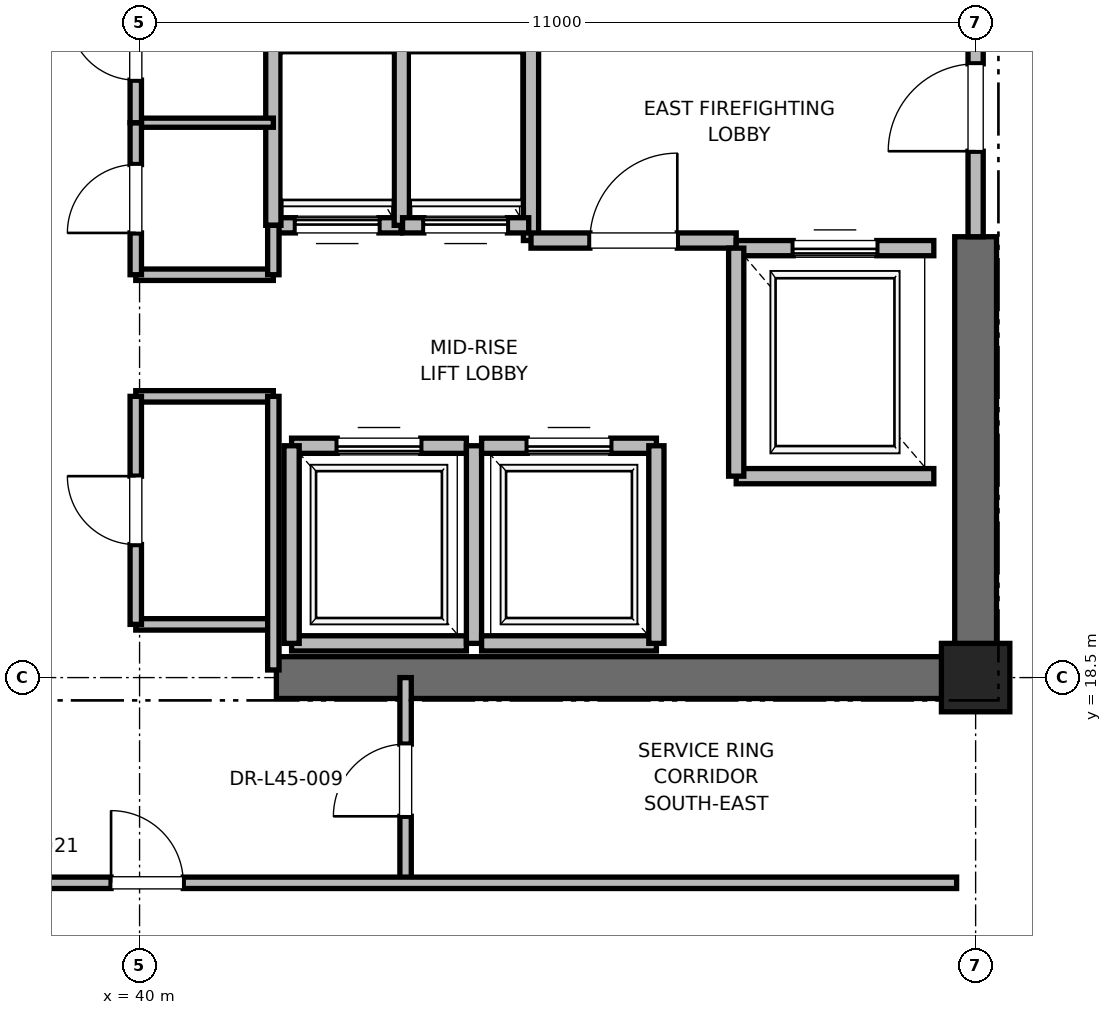
"""IFC4 building model, lengths in metres.
Left out: names, types, materials, properties, quantities, classifications, styles, units other than length and angle.
Written with IfcOpenShell. Run it as: python <this file> out.ifc"""

import sys

from ifc_helpers import new_model, si_unit, direction, frame, frame_2d, origin, origin_2d, place, context, subcontext, project, spatial, rectangle, extrude, element, fill, save


model = new_model("IFC4")
c1 = context("Model", 3, precision=1e-05, world=origin(), true_north=direction((0.0, 1.0)))
c2 = subcontext(c1, "Body", "Model", "MODEL_VIEW")
j1 = project(units=[si_unit("LENGTHUNIT", "METRE"), si_unit("PLANEANGLEUNIT", "RADIAN")], contexts=[c1])
p1 = place(None, origin())
s1 = spatial("IfcSite", under=j1, at=p1, CompositionType="ELEMENT")
p2 = place(p1, origin())
s2 = spatial("IfcBuilding", under=s1, at=p2, CompositionType="ELEMENT")
p3 = place(p2, frame((0.0, 0.0, 194.8)))
s3 = spatial("IfcBuildingStorey", under=s2, at=p3, CompositionType="ELEMENT", Elevation=194.8)
p4 = place(p3, frame((51.0, 18.5, 0.0), z_axis=(0.0, 0.0, 1.0), x_axis=(1.0, 0.0, 0.0)))
e1 = element("IfcColumn", 1, at=p4, inside=s3, PredefinedType="PILASTER", context=c2, shape_type="SweptSolid", body=[
    extrude(rectangle(XDim=0.9, YDim=0.9, at=origin_2d()), origin(), (0.0, 0.0, 1.0), 5.4),
])
p5 = place(p3, frame((41.8, 18.5, 0.0), z_axis=(0.0, 0.0, 1.0), x_axis=(1.0, 0.0, 0.0)))
e2 = element("IfcWall", 2, at=p5, inside=s3, PredefinedType="SHEAR", context=c2, shape_type="SweptSolid", body=[
    extrude(rectangle(XDim=9.2, YDim=0.55, at=frame_2d((4.6, 0.0))), origin(), (0.0, 0.0, 1.0), 5.1),
])
p6 = place(p3, frame((51.0, 18.5, 0.0), z_axis=(0.0, 0.0, 1.0), x_axis=(0.0, 1.0, 0.0)))
e3 = element("IfcWall", 3, at=p6, inside=s3, PredefinedType="SHEAR", context=c2, shape_type="SweptSolid", body=[
    extrude(rectangle(XDim=5.8, YDim=0.55, at=frame_2d((2.9, 0.0))), origin(), (0.0, 0.0, 1.0), 5.1),
])
p7 = place(p3, frame((45.15, 24.25, 0.0), z_axis=(0.0, 0.0, 1.0), x_axis=(0.0, 1.0, 0.0)))
e4 = element("IfcWall", 4, at=p7, inside=s3, PredefinedType="PARTITIONING", context=c2, shape_type="SweptSolid", body=[
    extrude(rectangle(XDim=3.37, YDim=0.2, at=frame_2d((1.685, 0.0))), origin(), (0.0, 0.0, 1.0), 5.1),
])
p8 = place(p3, frame((45.15, 24.25, 0.0), z_axis=(0.0, 0.0, 1.0), x_axis=(1.0, 0.0, 0.0)))
e5 = element("IfcWall", 5, at=p8, inside=s3, PredefinedType="PARTITIONING", context=c2, shape_type="SweptSolid", body=[
    extrude(rectangle(XDim=2.7, YDim=0.2, at=frame_2d((1.35, 0.0))), origin(), (0.0, 0.0, 1.0), 5.1),
])
p9 = place(p8, frame((0.775, 0.0, 0.0)))
e6 = element("IfcOpeningElement", 6, at=p9, cuts=e5, PredefinedType="OPENING", context=c2, shape_type="SweptSolid", body=[
    extrude(rectangle(XDim=1.15, YDim=2.2, at=frame_2d((0.575, 1.1))), frame((0.0, 0.1, 0.0), z_axis=(0.0, -1.0, 0.0), x_axis=(1.0, 0.0, 0.0)), (0.0, 0.0, 1.0), 0.2),
])
p10 = place(p3, frame((51.0, 24.3, 0.0), z_axis=(0.0, 0.0, 1.0), x_axis=(0.0, 1.0, 0.0)))
e7 = element("IfcWall", 7, at=p10, inside=s3, PredefinedType="PARTITIONING", context=c2, shape_type="SweptSolid", body=[
    extrude(rectangle(XDim=3.4, YDim=0.2, at=frame_2d((1.7, 0.0))), origin(), (0.0, 0.0, 1.0), 4.08),
])
p11 = place(p10, frame((1.125, 0.0, 0.0)))
e8 = element("IfcOpeningElement", 8, at=p11, cuts=e7, PredefinedType="OPENING", context=c2, shape_type="SweptSolid", body=[
    extrude(rectangle(XDim=1.15, YDim=2.2, at=frame_2d((0.575, 1.1))), frame((0.0, 0.1, 0.0), z_axis=(0.0, -1.0, 0.0), x_axis=(1.0, 0.0, 0.0)), (0.0, 0.0, 1.0), 0.2),
])
p12 = place(p3, frame((47.85, 21.15, 0.0), z_axis=(0.0, 0.0, 1.0), x_axis=(1.0, 0.0, 0.0)))
e9 = element("IfcWall", 9, at=p12, inside=s3, PredefinedType="SOLIDWALL", context=c2, shape_type="SweptSolid", body=[
    extrude(rectangle(XDim=2.6, YDim=0.2, at=frame_2d((1.3, 0.0))), origin(), (0.0, 0.0, 1.0), 5.1),
])
p13 = place(p3, frame((50.45, 24.15, 0.0), z_axis=(0.0, 0.0, 1.0), x_axis=(-1.0, 0.0, 0.0)))
e10 = element("IfcWall", 10, at=p13, inside=s3, PredefinedType="SOLIDWALL", context=c2, shape_type="SweptSolid", body=[
    extrude(rectangle(XDim=2.6, YDim=0.2, at=frame_2d((1.3, 0.0))), origin(), (0.0, 0.0, 1.0), 4.08),
])
p14 = place(p13, frame((0.75, 0.0, 0.0)))
e11 = element("IfcOpeningElement", 11, at=p14, cuts=e10, PredefinedType="OPENING", context=c2, shape_type="SweptSolid", body=[
    extrude(rectangle(XDim=1.1, YDim=2.2, at=frame_2d((0.55, 1.1))), frame((0.0, 0.1, 0.0), z_axis=(0.0, -1.0, 0.0), x_axis=(1.0, 0.0, 0.0)), (0.0, 0.0, 1.0), 0.2),
])
p15 = place(p3, frame((47.85, 24.15, 0.0), z_axis=(0.0, 0.0, 1.0), x_axis=(0.0, -1.0, 0.0)))
e12 = element("IfcWall", 12, at=p15, inside=s3, PredefinedType="SOLIDWALL", context=c2, shape_type="SweptSolid", body=[
    extrude(rectangle(XDim=3.0, YDim=0.2, at=frame_2d((1.5, 0.0))), origin(), (0.0, 0.0, 1.0), 5.1),
])
p16 = place(p3, frame((42.0, 18.95, 0.0), z_axis=(0.0, 0.0, 1.0), x_axis=(1.0, 0.0, 0.0)))
e13 = element("IfcWall", 13, at=p16, inside=s3, PredefinedType="SOLIDWALL", context=c2, shape_type="SweptSolid", body=[
    extrude(rectangle(XDim=2.3, YDim=0.2, at=frame_2d((1.15, 0.0))), origin(), (0.0, 0.0, 1.0), 4.08),
])
p17 = place(p3, frame((44.3, 21.55, 0.0), z_axis=(0.0, 0.0, 1.0), x_axis=(-1.0, 0.0, 0.0)))
e14 = element("IfcWall", 14, at=p17, inside=s3, PredefinedType="SOLIDWALL", context=c2, shape_type="SweptSolid", body=[
    extrude(rectangle(XDim=2.3, YDim=0.2, at=frame_2d((1.15, 0.0))), origin(), (0.0, 0.0, 1.0), 5.1),
])
p18 = place(p17, frame((0.6, 0.0, 0.0)))
e15 = element("IfcOpeningElement", 15, at=p18, cuts=e14, PredefinedType="OPENING", context=c2, shape_type="SweptSolid", body=[
    extrude(rectangle(XDim=1.1, YDim=2.2, at=frame_2d((0.55, 1.1))), frame((0.0, 0.1, 0.0), z_axis=(0.0, -1.0, 0.0), x_axis=(1.0, 0.0, 0.0)), (0.0, 0.0, 1.0), 0.2),
])
p19 = place(p3, frame((42.0, 21.55, 0.0), z_axis=(0.0, 0.0, 1.0), x_axis=(0.0, -1.0, 0.0)))
e16 = element("IfcWall", 16, at=p19, inside=s3, PredefinedType="SOLIDWALL", context=c2, shape_type="SweptSolid", body=[
    extrude(rectangle(XDim=2.6, YDim=0.2, at=frame_2d((1.3, 0.0))), origin(), (0.0, 0.0, 1.0), 4.08),
])
p20 = place(p3, frame((44.4, 18.95, 0.0), z_axis=(0.0, 0.0, 1.0), x_axis=(0.0, 1.0, 0.0)))
e17 = element("IfcWall", 17, at=p20, inside=s3, PredefinedType="SOLIDWALL", context=c2, shape_type="SweptSolid", body=[
    extrude(rectangle(XDim=2.6, YDim=0.2, at=frame_2d((1.3, 0.0))), origin(), (0.0, 0.0, 1.0), 5.1),
])
p21 = place(p3, frame((44.5, 18.95, 0.0), z_axis=(0.0, 0.0, 1.0), x_axis=(1.0, 0.0, 0.0)))
e18 = element("IfcWall", 18, at=p21, inside=s3, PredefinedType="SOLIDWALL", context=c2, shape_type="SweptSolid", body=[
    extrude(rectangle(XDim=2.3, YDim=0.2, at=frame_2d((1.15, 0.0))), origin(), (0.0, 0.0, 1.0), 5.1),
])
p22 = place(p3, frame((46.8, 21.55, 0.0), z_axis=(0.0, 0.0, 1.0), x_axis=(-1.0, 0.0, 0.0)))
e19 = element("IfcWall", 19, at=p22, inside=s3, PredefinedType="SOLIDWALL", context=c2, shape_type="SweptSolid", body=[
    extrude(rectangle(XDim=2.3, YDim=0.2, at=frame_2d((1.15, 0.0))), origin(), (0.0, 0.0, 1.0), 5.1),
])
p23 = place(p22, frame((0.6, 0.0, 0.0)))
e20 = element("IfcOpeningElement", 20, at=p23, cuts=e19, PredefinedType="OPENING", context=c2, shape_type="SweptSolid", body=[
    extrude(rectangle(XDim=1.1, YDim=2.2, at=frame_2d((0.55, 1.1))), frame((0.0, 0.1, 0.0), z_axis=(0.0, -1.0, 0.0), x_axis=(1.0, 0.0, 0.0)), (0.0, 0.0, 1.0), 0.2),
])
p24 = place(p3, frame((46.8, 18.95, 0.0), z_axis=(0.0, 0.0, 1.0), x_axis=(0.0, 1.0, 0.0)))
e21 = element("IfcWall", 21, at=p24, inside=s3, PredefinedType="SOLIDWALL", context=c2, shape_type="SweptSolid", body=[
    extrude(rectangle(XDim=2.6, YDim=0.2, at=frame_2d((1.3, 0.0))), origin(), (0.0, 0.0, 1.0), 5.1),
])
p25 = place(p3, frame((41.76, 24.45, 0.0), z_axis=(0.0, 0.0, 1.0), x_axis=(1.0, 0.0, 0.0)))
e22 = element("IfcWall", 22, at=p25, inside=s3, PredefinedType="SOLIDWALL", context=c2, shape_type="SweptSolid", body=[
    extrude(rectangle(XDim=1.68, YDim=0.2, at=frame_2d((0.84, 0.0))), origin(), (0.0, 0.0, 1.0), 5.1),
])
p26 = place(p25, frame((0.29, 0.0, 0.0)))
e23 = element("IfcOpeningElement", 23, at=p26, cuts=e22, PredefinedType="OPENING", context=c2, shape_type="SweptSolid", body=[
    extrude(rectangle(XDim=1.1, YDim=2.2, at=frame_2d((0.55, 1.1))), frame((0.0, 0.1, 0.0), z_axis=(0.0, -1.0, 0.0), x_axis=(1.0, 0.0, 0.0)), (0.0, 0.0, 1.0), 0.2),
])
for number, where, z_axis, x_axis in (
    (24, (41.76, 27.05, 0.0), (0.0, 0.0, 1.0), (0.0, -1.0, 0.0)),
    (25, (43.45, 24.45, 0.0), (0.0, 0.0, 1.0), (0.0, 1.0, 0.0)),
):
    element("IfcWall", number, at=place(p3, frame(where, z_axis=z_axis, x_axis=x_axis)), inside=s3, PredefinedType="SOLIDWALL", context=c2, shape_type="SweptSolid", body=[
        extrude(rectangle(XDim=2.6, YDim=0.2, at=frame_2d((1.3, 0.0))), origin(), (0.0, 0.0, 1.0), 5.1),
    ])
p27 = place(p3, frame((43.46, 24.45, 0.0), z_axis=(0.0, 0.0, 1.0), x_axis=(1.0, 0.0, 0.0)))
e26 = element("IfcWall", 26, at=p27, inside=s3, PredefinedType="SOLIDWALL", context=c2, shape_type="SweptSolid", body=[
    extrude(rectangle(XDim=1.66, YDim=0.2, at=frame_2d((0.83, 0.0))), origin(), (0.0, 0.0, 1.0), 5.1),
])
p28 = place(p27, frame((0.28, 0.0, 0.0)))
e27 = element("IfcOpeningElement", 27, at=p28, cuts=e26, PredefinedType="OPENING", context=c2, shape_type="SweptSolid", body=[
    extrude(rectangle(XDim=1.1, YDim=2.2, at=frame_2d((0.55, 1.1))), frame((0.0, 0.1, 0.0), z_axis=(0.0, -1.0, 0.0), x_axis=(1.0, 0.0, 0.0)), (0.0, 0.0, 1.0), 0.2),
])
for number, where, z_axis, x_axis in (
    (28, (39.95, 19.2, 0.0), (0.0, 0.0, 1.0), (1.0, 0.0, 0.0)),
    (29, (39.95, 22.2, 0.0), (0.0, 0.0, 1.0), (1.0, 0.0, 0.0)),
    (30, (39.95, 23.8, 0.0), (0.0, 0.0, 1.0), (1.0, 0.0, 0.0)),
):
    element("IfcWall", number, at=place(p3, frame(where, z_axis=z_axis, x_axis=x_axis)), inside=s3, PredefinedType="PARTITIONING", context=c2, shape_type="SweptSolid", body=[
        extrude(rectangle(XDim=1.81, YDim=0.15, at=frame_2d((0.905, 0.0))), origin(), (0.0, 0.0, 1.0), 2.85),
    ])
p29 = place(p3, frame((39.95, 25.8, 0.0), z_axis=(0.0, 0.0, 1.0), x_axis=(1.0, 0.0, 0.0)))
e31 = element("IfcWall", 31, at=p29, inside=s3, PredefinedType="PARTITIONING", context=c2, shape_type="SweptSolid", body=[
    extrude(rectangle(XDim=1.81, YDim=0.12, at=frame_2d((0.905, 0.0))), origin(), (0.0, 0.0, 1.0), 2.85),
])
p30 = place(p3, frame((41.76, 18.6, 0.0), z_axis=(0.0, 0.0, 1.0), x_axis=(0.0, 1.0, 0.0)))
e32 = element("IfcWall", 32, at=p30, inside=s3, PredefinedType="PARTITIONING", context=c2, shape_type="SweptSolid", body=[
    extrude(rectangle(XDim=3.6, YDim=0.15, at=frame_2d((1.8, 0.0))), origin(), (0.0, 0.0, 1.0), 2.85),
])
p31 = place(p3, frame((41.76, 23.8, 0.0), z_axis=(0.0, 0.0, 1.0), x_axis=(0.0, 1.0, 0.0)))
e33 = element("IfcWall", 33, at=p31, inside=s3, PredefinedType="PARTITIONING", context=c2, shape_type="SweptSolid", body=[
    extrude(rectangle(XDim=0.65, YDim=0.15, at=frame_2d((0.325, 0.0))), origin(), (0.0, 0.0, 1.0), 2.85),
])
p32 = place(p3, frame((39.95, 19.2, 0.0), z_axis=(0.0, 0.0, 1.0), x_axis=(0.0, 1.0, 0.0)))
e34 = element("IfcWall", 34, at=p32, inside=s3, PredefinedType="PARTITIONING", context=c2, shape_type="SweptSolid", body=[
    extrude(rectangle(XDim=3.0, YDim=0.15, at=frame_2d((1.5, 0.0))), origin(), (0.0, 0.0, 1.0), 2.85),
])
p33 = place(p32, frame((1.05, 0.0, 0.0)))
e35 = element("IfcOpeningElement", 35, at=p33, cuts=e34, PredefinedType="OPENING", context=c2, shape_type="SweptSolid", body=[
    extrude(rectangle(XDim=0.9, YDim=2.1, at=frame_2d((0.45, 1.05))), frame((0.0, 0.075, 0.0), z_axis=(0.0, -1.0, 0.0), x_axis=(1.0, 0.0, 0.0)), (0.0, 0.0, 1.0), 0.15),
])
p34 = place(p3, frame((39.95, 23.8, 0.0), z_axis=(0.0, 0.0, 1.0), x_axis=(0.0, 1.0, 0.0)))
e36 = element("IfcWall", 36, at=p34, inside=s3, PredefinedType="PARTITIONING", context=c2, shape_type="SweptSolid", body=[
    extrude(rectangle(XDim=2.0, YDim=0.15, at=frame_2d((1.0, 0.0))), origin(), (0.0, 0.0, 1.0), 2.85),
])
p35 = place(p34, frame((0.55, 0.0, 0.0)))
e37 = element("IfcOpeningElement", 37, at=p35, cuts=e36, PredefinedType="OPENING", context=c2, shape_type="SweptSolid", body=[
    extrude(rectangle(XDim=0.9, YDim=2.1, at=frame_2d((0.45, 1.05))), frame((0.0, 0.075, 0.0), z_axis=(0.0, -1.0, 0.0), x_axis=(1.0, 0.0, 0.0)), (0.0, 0.0, 1.0), 0.15),
])
p36 = place(p3, frame((39.95, 25.8, 0.0), z_axis=(0.0, 0.0, 1.0), x_axis=(0.0, 1.0, 0.0)))
e38 = element("IfcWall", 38, at=p36, inside=s3, PredefinedType="PARTITIONING", context=c2, shape_type="SweptSolid", body=[
    extrude(rectangle(XDim=2.0, YDim=0.15, at=frame_2d((1.0, 0.0))), origin(), (0.0, 0.0, 1.0), 2.85),
])
p37 = place(p36, frame((0.56, 0.0, 0.0)))
e39 = element("IfcOpeningElement", 39, at=p37, cuts=e38, PredefinedType="OPENING", context=c2, shape_type="SweptSolid", body=[
    extrude(rectangle(XDim=0.88, YDim=2.1, at=frame_2d((0.44, 1.05))), frame((0.0, 0.075, 0.0), z_axis=(0.0, -1.0, 0.0), x_axis=(1.0, 0.0, 0.0)), (0.0, 0.0, 1.0), 0.15),
])
p38 = place(p3, frame((43.5, 15.8, 0.0), z_axis=(0.0, 0.0, 1.0), x_axis=(0.0, 1.0, 0.0)))
e40 = element("IfcWall", 40, at=p38, inside=s3, PredefinedType="PARTITIONING", context=c2, shape_type="SweptSolid", body=[
    extrude(rectangle(XDim=2.7, YDim=0.15, at=frame_2d((1.35, 0.0))), origin(), (0.0, 0.0, 1.0), 2.85),
])
p39 = place(p38, frame((0.875, 0.0, 0.0)))
e41 = element("IfcOpeningElement", 41, at=p39, cuts=e40, PredefinedType="OPENING", context=c2, shape_type="SweptSolid", body=[
    extrude(rectangle(XDim=0.95, YDim=2.15, at=frame_2d((0.475, 1.075))), frame((0.0, 0.075, 0.0), z_axis=(0.0, -1.0, 0.0), x_axis=(1.0, 0.0, 0.0)), (0.0, 0.0, 1.0), 0.15),
])
p40 = place(p3, frame((29.25, 15.8, 0.0), z_axis=(0.0, 0.0, 1.0), x_axis=(1.0, 0.0, 0.0)))
e42 = element("IfcWall", 42, at=p40, inside=s3, PredefinedType="PARTITIONING", context=c2, shape_type="SweptSolid", body=[
    extrude(rectangle(XDim=21.5, YDim=0.15, at=frame_2d((10.75, 0.0))), origin(), (0.0, 0.0, 1.0), 2.85),
])
p41 = place(p40, frame((10.375, 0.0, 0.0)))
e43 = element("IfcOpeningElement", 43, at=p41, cuts=e42, PredefinedType="OPENING", context=c2, shape_type="SweptSolid", body=[
    extrude(rectangle(XDim=0.95, YDim=2.15, at=frame_2d((0.475, 1.075))), frame((0.0, 0.075, 0.0), z_axis=(0.0, -1.0, 0.0), x_axis=(1.0, 0.0, 0.0)), (0.0, 0.0, 1.0), 0.15),
])
p42 = place(p9, origin())
e44 = element("IfcDoor", 44, at=p42, inside=s3, OperationType="SINGLE_SWING_RIGHT", PredefinedType="DOOR", context=c2, shape_type="SweptSolid", body=[
    extrude(rectangle(XDim=1.15, YDim=2.2, at=frame_2d((0.575, 1.1))), frame((0.0, 0.025, 0.0), z_axis=(0.0, -1.0, 0.0), x_axis=(1.0, 0.0, 0.0)), (0.0, 0.0, 1.0), 0.05),
])
fill(e6, e44)
p43 = place(p11, origin())
e45 = element("IfcDoor", 45, at=p43, inside=s3, OperationType="SINGLE_SWING_LEFT", PredefinedType="DOOR", context=c2, shape_type="SweptSolid", body=[
    extrude(rectangle(XDim=1.15, YDim=2.2, at=frame_2d((0.575, 1.1))), frame((0.0, 0.025, 0.0), z_axis=(0.0, -1.0, 0.0), x_axis=(1.0, 0.0, 0.0)), (0.0, 0.0, 1.0), 0.05),
])
fill(e8, e45)
p44 = place(p14, origin())
e46 = element("IfcDoor", 46, at=p44, inside=s3, OperationType="SLIDING_TO_RIGHT", PredefinedType="DOOR", context=c2, shape_type="SweptSolid", body=[
    extrude(rectangle(XDim=1.1, YDim=2.2, at=frame_2d((0.55, 1.1))), frame((0.0, 0.025, 0.0), z_axis=(0.0, -1.0, 0.0), x_axis=(1.0, 0.0, 0.0)), (0.0, 0.0, 1.0), 0.05),
])
fill(e11, e46)
p45 = place(p18, origin())
e47 = element("IfcDoor", 47, at=p45, inside=s3, OperationType="SLIDING_TO_RIGHT", PredefinedType="DOOR", context=c2, shape_type="SweptSolid", body=[
    extrude(rectangle(XDim=1.1, YDim=2.2, at=frame_2d((0.55, 1.1))), frame((0.0, 0.025, 0.0), z_axis=(0.0, -1.0, 0.0), x_axis=(1.0, 0.0, 0.0)), (0.0, 0.0, 1.0), 0.05),
])
fill(e15, e47)
p46 = place(p23, origin())
e48 = element("IfcDoor", 48, at=p46, inside=s3, OperationType="SLIDING_TO_RIGHT", PredefinedType="DOOR", context=c2, shape_type="SweptSolid", body=[
    extrude(rectangle(XDim=1.1, YDim=2.2, at=frame_2d((0.55, 1.1))), frame((0.0, 0.025, 0.0), z_axis=(0.0, -1.0, 0.0), x_axis=(1.0, 0.0, 0.0)), (0.0, 0.0, 1.0), 0.05),
])
fill(e20, e48)
p47 = place(p26, origin())
e49 = element("IfcDoor", 49, at=p47, inside=s3, OperationType="SLIDING_TO_RIGHT", PredefinedType="DOOR", context=c2, shape_type="SweptSolid", body=[
    extrude(rectangle(XDim=1.1, YDim=2.2, at=frame_2d((0.55, 1.1))), frame((0.0, 0.025, 0.0), z_axis=(0.0, -1.0, 0.0), x_axis=(1.0, 0.0, 0.0)), (0.0, 0.0, 1.0), 0.05),
])
fill(e23, e49)
p48 = place(p28, origin())
e50 = element("IfcDoor", 50, at=p48, inside=s3, OperationType="SLIDING_TO_RIGHT", PredefinedType="DOOR", context=c2, shape_type="SweptSolid", body=[
    extrude(rectangle(XDim=1.1, YDim=2.2, at=frame_2d((0.55, 1.1))), frame((0.0, 0.025, 0.0), z_axis=(0.0, -1.0, 0.0), x_axis=(1.0, 0.0, 0.0)), (0.0, 0.0, 1.0), 0.05),
])
fill(e27, e50)
p49 = place(p33, origin())
e51 = element("IfcDoor", 51, at=p49, inside=s3, OperationType="SINGLE_SWING_RIGHT", PredefinedType="DOOR", context=c2, shape_type="SweptSolid", body=[
    extrude(rectangle(XDim=0.9, YDim=2.1, at=frame_2d((0.45, 1.05))), frame((0.0, 0.025, 0.0), z_axis=(0.0, -1.0, 0.0), x_axis=(1.0, 0.0, 0.0)), (0.0, 0.0, 1.0), 0.05),
])
fill(e35, e51)
p50 = place(p35, origin())
e52 = element("IfcDoor", 52, at=p50, inside=s3, OperationType="SINGLE_SWING_LEFT", PredefinedType="DOOR", context=c2, shape_type="SweptSolid", body=[
    extrude(rectangle(XDim=0.9, YDim=2.1, at=frame_2d((0.45, 1.05))), frame((0.0, 0.025, 0.0), z_axis=(0.0, -1.0, 0.0), x_axis=(1.0, 0.0, 0.0)), (0.0, 0.0, 1.0), 0.05),
])
fill(e37, e52)
p51 = place(p37, origin())
e53 = element("IfcDoor", 53, at=p51, inside=s3, OperationType="SINGLE_SWING_RIGHT", PredefinedType="DOOR", context=c2, shape_type="SweptSolid", body=[
    extrude(rectangle(XDim=0.88, YDim=2.1, at=frame_2d((0.44, 1.05))), frame((0.0, 0.025, 0.0), z_axis=(0.0, -1.0, 0.0), x_axis=(1.0, 0.0, 0.0)), (0.0, 0.0, 1.0), 0.05),
])
fill(e39, e53)
p52 = place(p39, origin())
e54 = element("IfcDoor", 54, at=p52, inside=s3, OperationType="SINGLE_SWING_LEFT", PredefinedType="DOOR", context=c2, shape_type="SweptSolid", body=[
    extrude(rectangle(XDim=0.95, YDim=2.15, at=frame_2d((0.475, 1.075))), frame((0.0, 0.025, 0.0), z_axis=(0.0, -1.0, 0.0), x_axis=(1.0, 0.0, 0.0)), (0.0, 0.0, 1.0), 0.05),
])
fill(e41, e54)
p53 = place(p41, origin())
e55 = element("IfcDoor", 55, at=p53, inside=s3, OperationType="SINGLE_SWING_LEFT", PredefinedType="DOOR", context=c2, shape_type="SweptSolid", body=[
    extrude(rectangle(XDim=0.95, YDim=2.15, at=frame_2d((0.475, 1.075))), frame((0.0, 0.025, 0.0), z_axis=(0.0, -1.0, 0.0), x_axis=(1.0, 0.0, 0.0)), (0.0, 0.0, 1.0), 0.05),
])
fill(e43, e55)
save(model, sys.argv[1])
